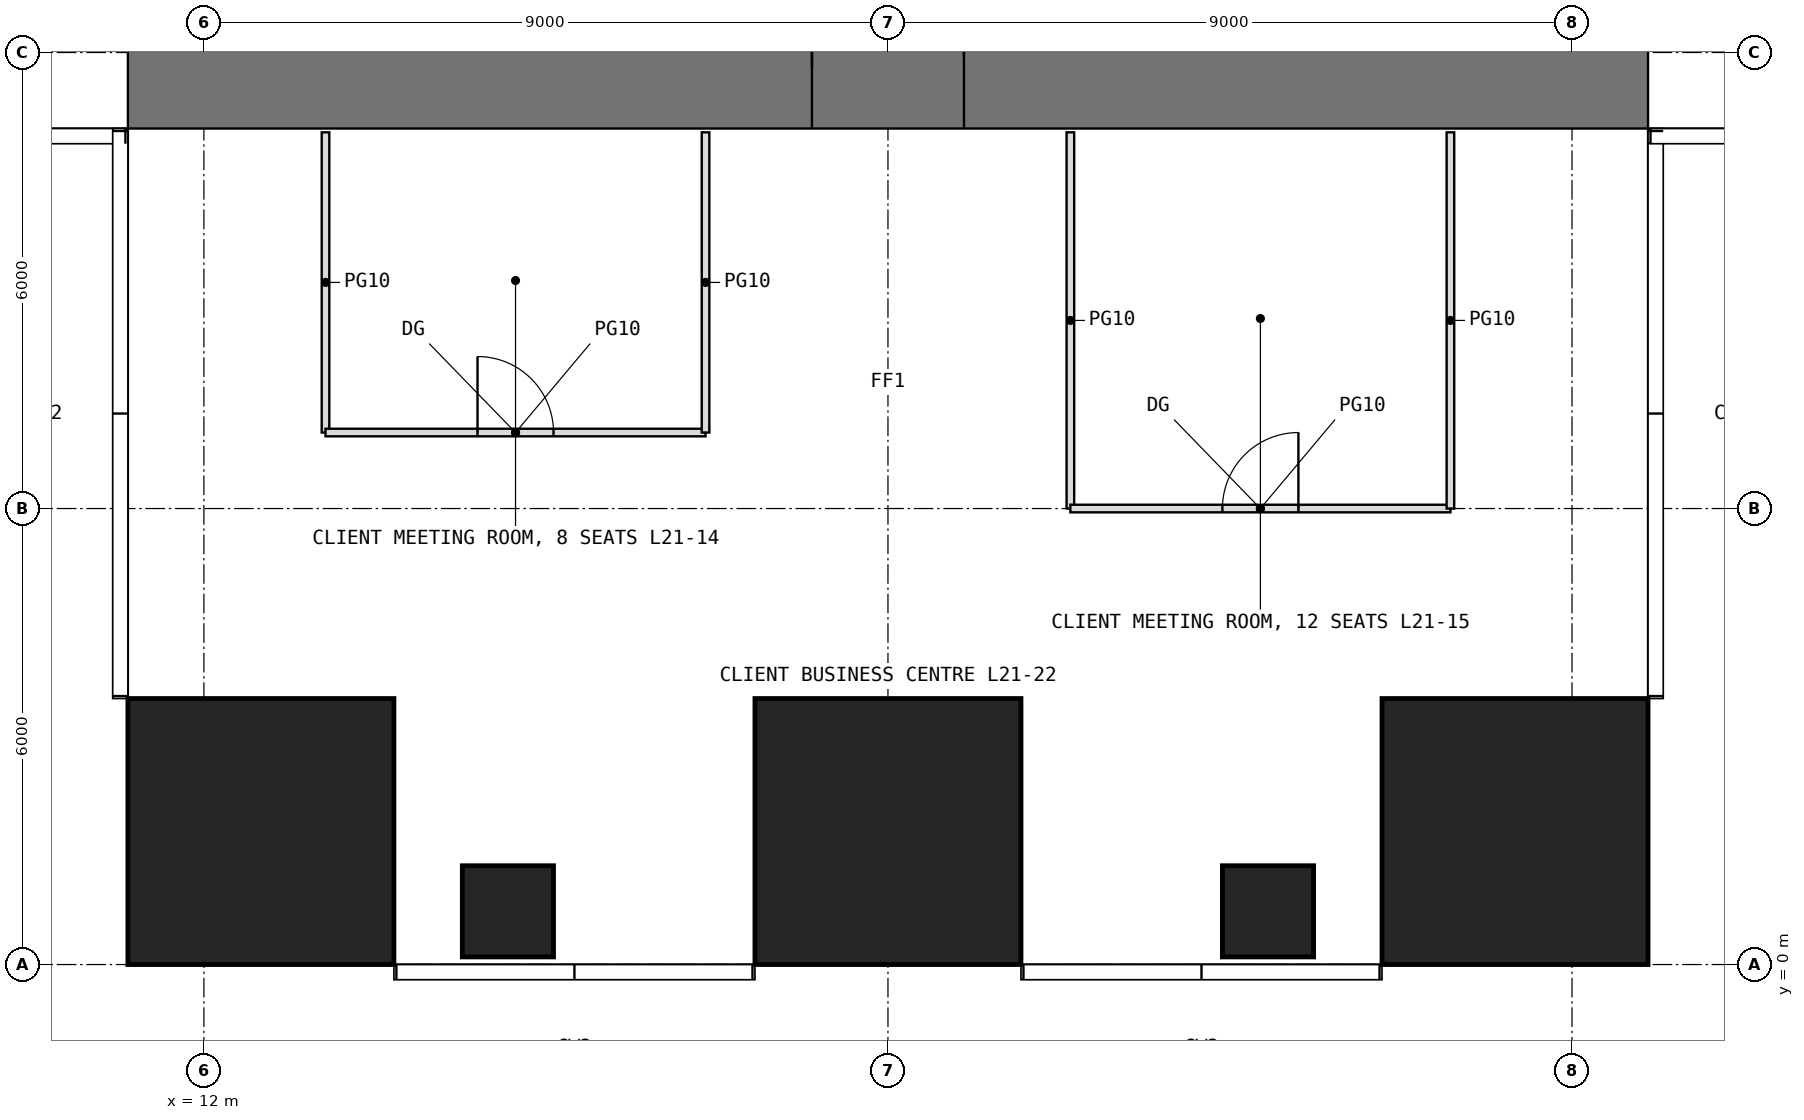
"""IFC4 building model, lengths in metres.
Left out: names, types, materials, properties, quantities, classifications, styles, units other than length and angle.
Written with IfcOpenShell. Run it as: python <this file> out.ifc"""

import sys

from ifc_helpers import new_model, si_unit, direction, frame, frame_2d, origin, origin_2d, place, context, subcontext, project, spatial, rectangle, extrude, element, fill, save


model = new_model("IFC4")
c1 = context("Model", 3, precision=1e-05, world=origin(), true_north=direction((0.0, 1.0)))
c2 = subcontext(c1, "Body", "Model", "MODEL_VIEW")
j1 = project(units=[si_unit("LENGTHUNIT", "METRE"), si_unit("PLANEANGLEUNIT", "RADIAN")], contexts=[c1])
p1 = place(None, origin())
s1 = spatial("IfcSite", under=j1, at=p1, CompositionType="ELEMENT")
p2 = place(p1, origin())
s2 = spatial("IfcBuilding", under=s1, at=p2, CompositionType="ELEMENT")
p3 = place(p2, frame((0.0, 0.0, 91.5)))
s3 = spatial("IfcBuildingStorey", under=s2, at=p3, CompositionType="ELEMENT", Elevation=91.5)
p4 = place(p3, frame((12.75, 1.75, 0.0), z_axis=(0.0, 0.0, 1.0), x_axis=(1.0, 0.0, 0.0)))
e1 = element("IfcColumn", 1, at=p4, inside=s3, PredefinedType="COLUMN", context=c2, shape_type="SweptSolid", body=[
    extrude(rectangle(XDim=3.5, YDim=3.5, at=origin_2d()), origin(), (0.0, 0.0, 1.0), 5.0),
])
p5 = place(p3, frame((16.0, 0.7, 0.0), z_axis=(0.0, 0.0, 1.0), x_axis=(1.0, 0.0, 0.0)))
e2 = element("IfcColumn", 2, at=p5, inside=s3, PredefinedType="COLUMN", context=c2, shape_type="SweptSolid", body=[
    extrude(rectangle(XDim=1.2, YDim=1.2, at=origin_2d()), origin(), (0.0, 0.0, 1.0), 5.0),
])
p6 = place(p3, frame((21.0, 1.75, 0.0), z_axis=(0.0, 0.0, 1.0), x_axis=(1.0, 0.0, 0.0)))
e3 = element("IfcColumn", 3, at=p6, inside=s3, PredefinedType="COLUMN", context=c2, shape_type="SweptSolid", body=[
    extrude(rectangle(XDim=3.5, YDim=3.5, at=origin_2d()), origin(), (0.0, 0.0, 1.0), 5.0),
])
p7 = place(p3, frame((26.0, 0.7, 0.0), z_axis=(0.0, 0.0, 1.0), x_axis=(1.0, 0.0, 0.0)))
e4 = element("IfcColumn", 4, at=p7, inside=s3, PredefinedType="COLUMN", context=c2, shape_type="SweptSolid", body=[
    extrude(rectangle(XDim=1.2, YDim=1.2, at=origin_2d()), origin(), (0.0, 0.0, 1.0), 5.0),
])
p8 = place(p3, frame((29.25, 1.75, 0.0), z_axis=(0.0, 0.0, 1.0), x_axis=(1.0, 0.0, 0.0)))
e5 = element("IfcColumn", 5, at=p8, inside=s3, PredefinedType="COLUMN", context=c2, shape_type="SweptSolid", body=[
    extrude(rectangle(XDim=3.5, YDim=3.5, at=origin_2d()), origin(), (0.0, 0.0, 1.0), 5.0),
])
p9 = place(p3, frame((11.0, 11.8, -0.05), z_axis=(0.0, 0.0, 1.0), x_axis=(1.0, 0.0, 0.0)))
e6 = element("IfcWall", 6, at=p9, inside=s3, PredefinedType="SHEAR", context=c2, shape_type="SweptSolid", body=[
    extrude(rectangle(XDim=20.0, YDim=1.6, at=frame_2d((10.0, 0.0))), origin(), (0.0, 0.0, 1.0), 5.0),
])
p10 = place(p9, frame((9.0, 0.0, 0.05)))
e7 = element("IfcOpeningElement", 7, at=p10, cuts=e6, PredefinedType="OPENING", context=c2, shape_type="SweptSolid", body=[
    extrude(rectangle(XDim=2.0, YDim=2.2, at=frame_2d((1.0, 1.1))), frame((0.0, 0.81, 0.0), z_axis=(0.0, -1.0, 0.0), x_axis=(1.0, 0.0, 0.0)), (0.0, 0.0, 1.0), 1.62),
])
p11 = place(p3, frame((13.6, 7.0, 0.0), z_axis=(0.0, 0.0, 1.0), x_axis=(0.0, 1.0, 0.0)))
e8 = element("IfcWall", 8, at=p11, inside=s3, PredefinedType="PARTITIONING", context=c2, shape_type="SweptSolid", body=[
    extrude(rectangle(XDim=3.95, YDim=0.1, at=frame_2d((1.975, 0.0))), origin(), (0.0, 0.0, 1.0), 4.75),
])
p12 = place(p3, frame((13.6, 7.0, 0.0), z_axis=(0.0, 0.0, 1.0), x_axis=(1.0, 0.0, 0.0)))
e9 = element("IfcWall", 9, at=p12, inside=s3, PredefinedType="PARTITIONING", context=c2, shape_type="SweptSolid", body=[
    extrude(rectangle(XDim=5.0, YDim=0.1, at=frame_2d((2.5, 0.0))), origin(), (0.0, 0.0, 1.0), 4.75),
])
p13 = place(p12, frame((2.0, 0.0, 0.0)))
e10 = element("IfcOpeningElement", 10, at=p13, cuts=e9, PredefinedType="OPENING", context=c2, shape_type="SweptSolid", body=[
    extrude(rectangle(XDim=1.0, YDim=2.4, at=frame_2d((0.5, 1.2))), frame((0.0, 0.06, 0.0), z_axis=(0.0, -1.0, 0.0), x_axis=(1.0, 0.0, 0.0)), (0.0, 0.0, 1.0), 0.12),
])
p14 = place(p3, frame((18.6, 7.0, 0.0), z_axis=(0.0, 0.0, 1.0), x_axis=(0.0, 1.0, 0.0)))
e11 = element("IfcWall", 11, at=p14, inside=s3, PredefinedType="PARTITIONING", context=c2, shape_type="SweptSolid", body=[
    extrude(rectangle(XDim=3.95, YDim=0.1, at=frame_2d((1.975, 0.0))), origin(), (0.0, 0.0, 1.0), 4.75),
])
p15 = place(p3, frame((23.4, 6.0, 0.0), z_axis=(0.0, 0.0, 1.0), x_axis=(0.0, 1.0, 0.0)))
e12 = element("IfcWall", 12, at=p15, inside=s3, PredefinedType="PARTITIONING", context=c2, shape_type="SweptSolid", body=[
    extrude(rectangle(XDim=4.95, YDim=0.1, at=frame_2d((2.475, 0.0))), origin(), (0.0, 0.0, 1.0), 4.75),
])
p16 = place(p3, frame((23.4, 6.0, 0.0), z_axis=(0.0, 0.0, 1.0), x_axis=(1.0, 0.0, 0.0)))
e13 = element("IfcWall", 13, at=p16, inside=s3, PredefinedType="PARTITIONING", context=c2, shape_type="SweptSolid", body=[
    extrude(rectangle(XDim=5.0, YDim=0.1, at=frame_2d((2.5, 0.0))), origin(), (0.0, 0.0, 1.0), 4.75),
])
p17 = place(p16, frame((2.0, 0.0, 0.0)))
e14 = element("IfcOpeningElement", 14, at=p17, cuts=e13, PredefinedType="OPENING", context=c2, shape_type="SweptSolid", body=[
    extrude(rectangle(XDim=1.0, YDim=2.4, at=frame_2d((0.5, 1.2))), frame((0.0, 0.06, 0.0), z_axis=(0.0, -1.0, 0.0), x_axis=(1.0, 0.0, 0.0)), (0.0, 0.0, 1.0), 0.12),
])
p18 = place(p3, frame((28.4, 6.0, 0.0), z_axis=(0.0, 0.0, 1.0), x_axis=(0.0, 1.0, 0.0)))
e15 = element("IfcWall", 15, at=p18, inside=s3, PredefinedType="PARTITIONING", context=c2, shape_type="SweptSolid", body=[
    extrude(rectangle(XDim=4.95, YDim=0.1, at=frame_2d((2.475, 0.0))), origin(), (0.0, 0.0, 1.0), 4.75),
])
p19 = place(p10, origin())
e16 = element("IfcDoor", 16, at=p19, inside=s3, OperationType="DOUBLE_DOOR_SINGLE_SWING", PredefinedType="DOOR", context=c2, shape_type="SweptSolid", body=[
    extrude(rectangle(XDim=2.0, YDim=2.2, at=frame_2d((1.0, 1.1))), frame((0.0, 0.025, 0.0), z_axis=(0.0, -1.0, 0.0), x_axis=(1.0, 0.0, 0.0)), (0.0, 0.0, 1.0), 0.05),
])
fill(e7, e16)
p20 = place(p13, origin())
e17 = element("IfcDoor", 17, at=p20, inside=s3, OperationType="SINGLE_SWING_LEFT", PredefinedType="DOOR", context=c2, shape_type="SweptSolid", body=[
    extrude(rectangle(XDim=1.0, YDim=2.4, at=frame_2d((0.5, 1.2))), frame((0.0, 0.025, 0.0), z_axis=(0.0, -1.0, 0.0), x_axis=(1.0, 0.0, 0.0)), (0.0, 0.0, 1.0), 0.05),
])
fill(e10, e17)
p21 = place(p17, origin())
e18 = element("IfcDoor", 18, at=p21, inside=s3, OperationType="SINGLE_SWING_RIGHT", PredefinedType="DOOR", context=c2, shape_type="SweptSolid", body=[
    extrude(rectangle(XDim=1.0, YDim=2.4, at=frame_2d((0.5, 1.2))), frame((0.0, 0.025, 0.0), z_axis=(0.0, -1.0, 0.0), x_axis=(1.0, 0.0, 0.0)), (0.0, 0.0, 1.0), 0.05),
])
fill(e14, e18)
save(model, sys.argv[1])
